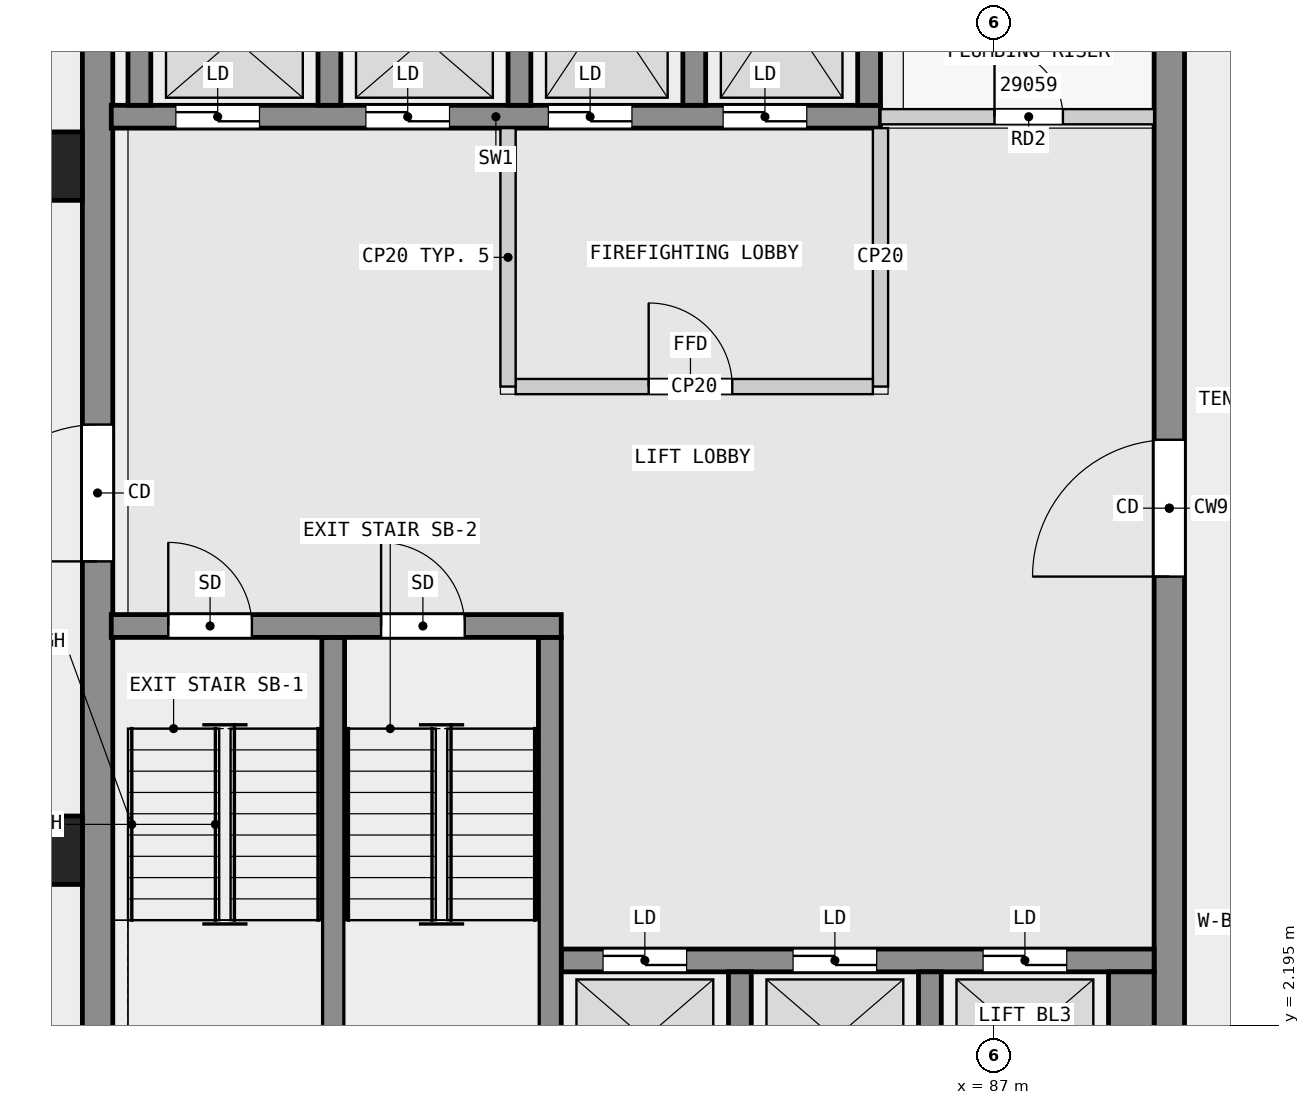
"""IFC4 building model, lengths in metres.
Left out: names, types, materials, properties, quantities, classifications, styles, units other than length and angle.
Written with IfcOpenShell. Run it as: python <this file> out.ifc"""

import sys

from ifc_helpers import new_model, si_unit, direction, frame, frame_2d, origin, origin_2d, place, context, subcontext, project, spatial, rectangle, extrude, element, fill, save


model = new_model("IFC4")
c1 = context("Model", 3, precision=1e-05, world=origin(), true_north=direction((0.0, 1.0)))
c2 = subcontext(c1, "Body", "Model", "MODEL_VIEW")
j1 = project(units=[si_unit("LENGTHUNIT", "METRE"), si_unit("PLANEANGLEUNIT", "RADIAN")], contexts=[c1])
p1 = place(None, origin())
s1 = spatial("IfcSite", under=j1, at=p1, CompositionType="ELEMENT")
p2 = place(p1, origin())
s2 = spatial("IfcBuilding", under=s1, at=p2, CompositionType="ELEMENT")
p3 = place(p2, frame((0.0, 0.0, 113.3)))
s3 = spatial("IfcBuildingStorey", under=s2, at=p3, CompositionType="ELEMENT", Elevation=113.3)
for number, where, z_axis, x_axis in (
    (1, (74.55, 13.5, 0.0), (0.0, 0.0, 1.0), (1.0, 0.0, 0.0)),
    (2, (74.55, 4.5, 0.0), (0.0, 0.0, 1.0), (1.0, 0.0, 0.0)),
):
    element("IfcColumn", number, at=place(p3, frame(where, z_axis=z_axis, x_axis=x_axis)), inside=s3, PredefinedType="COLUMN", context=c2, shape_type="SweptSolid", body=[
        extrude(rectangle(XDim=0.9, YDim=0.9, at=origin_2d()), origin(), (0.0, 0.0, 1.0), 3.5),
    ])
p4 = place(p3, frame((75.2, 0.4, 0.0), z_axis=(0.0, 0.0, 1.0), x_axis=(0.0, 1.0, 0.0)))
e3 = element("IfcWall", 3, at=p4, inside=s3, PredefinedType="SHEAR", context=c2, shape_type="SweptSolid", body=[
    extrude(rectangle(XDim=17.2, YDim=0.4, at=frame_2d((8.6, 0.0))), origin(), (0.0, 0.0, 1.0), 3.25),
])
p5 = place(p4, frame((7.9, 0.0, 0.0)))
e4 = element("IfcOpeningElement", 4, at=p5, cuts=e3, PredefinedType="OPENING", context=c2, shape_type="SweptSolid", body=[
    extrude(rectangle(XDim=1.8, YDim=2.1, at=frame_2d((0.9, 1.05))), frame((0.0, 0.21, 0.0), z_axis=(0.0, -1.0, 0.0), x_axis=(1.0, 0.0, 0.0)), (0.0, 0.0, 1.0), 0.42),
])
p6 = place(p3, frame((89.3, 0.4, 0.0), z_axis=(0.0, 0.0, 1.0), x_axis=(0.0, 1.0, 0.0)))
e5 = element("IfcWall", 5, at=p6, inside=s3, PredefinedType="SHEAR", context=c2, shape_type="SweptSolid", body=[
    extrude(rectangle(XDim=17.2, YDim=0.4, at=frame_2d((8.6, 0.0))), origin(), (0.0, 0.0, 1.0), 3.25),
])
p7 = place(p6, frame((7.7, 0.0, 0.0)))
e6 = element("IfcOpeningElement", 6, at=p7, cuts=e5, PredefinedType="OPENING", context=c2, shape_type="SweptSolid", body=[
    extrude(rectangle(XDim=1.8, YDim=2.1, at=frame_2d((0.9, 1.05))), frame((0.0, 0.21, 0.0), z_axis=(0.0, -1.0, 0.0), x_axis=(1.0, 0.0, 0.0)), (0.0, 0.0, 1.0), 0.42),
])
p8 = place(p6, frame((15.925, 0.0, 0.0)))
e7 = element("IfcOpeningElement", 7, at=p8, cuts=e5, PredefinedType="OPENING", context=c2, shape_type="SweptSolid", body=[
    extrude(rectangle(XDim=0.9, YDim=2.1, at=frame_2d((0.45, 1.05))), frame((0.0, 0.21, 0.0), z_axis=(0.0, -1.0, 0.0), x_axis=(1.0, 0.0, 0.0)), (0.0, 0.0, 1.0), 0.42),
])
p9 = place(p3, frame((75.38, 7.45, 0.0), z_axis=(0.0, 0.0, 1.0), x_axis=(1.0, 0.0, 0.0)))
e8 = element("IfcWall", 8, at=p9, inside=s3, PredefinedType="SHEAR", context=c2, shape_type="SweptSolid", body=[
    extrude(rectangle(XDim=5.92, YDim=0.3, at=frame_2d((2.96, 0.0))), origin(), (0.0, 0.0, 1.0), 3.25),
])
p10 = place(p9, frame((0.75, 0.0, 0.0)))
e9 = element("IfcOpeningElement", 9, at=p10, cuts=e8, PredefinedType="OPENING", context=c2, shape_type="SweptSolid", body=[
    extrude(rectangle(XDim=1.1, YDim=2.1, at=frame_2d((0.55, 1.05))), frame((0.0, 0.16, 0.0), z_axis=(0.0, -1.0, 0.0), x_axis=(1.0, 0.0, 0.0)), (0.0, 0.0, 1.0), 0.32),
])
p11 = place(p9, frame((3.55, 0.0, 0.0)))
e10 = element("IfcOpeningElement", 10, at=p11, cuts=e8, PredefinedType="OPENING", context=c2, shape_type="SweptSolid", body=[
    extrude(rectangle(XDim=1.1, YDim=2.1, at=frame_2d((0.55, 1.05))), frame((0.0, 0.16, 0.0), z_axis=(0.0, -1.0, 0.0), x_axis=(1.0, 0.0, 0.0)), (0.0, 0.0, 1.0), 0.32),
])
for number, where, z_axis, x_axis in (
    (11, (78.3, 0.9, 0.0), (0.0, 0.0, 1.0), (0.0, 1.0, 0.0)),
    (12, (81.15, 0.9, 0.0), (0.0, 0.0, 1.0), (0.0, 1.0, 0.0)),
):
    element("IfcWall", number, at=place(p3, frame(where, z_axis=z_axis, x_axis=x_axis)), inside=s3, PredefinedType="SHEAR", context=c2, shape_type="SweptSolid", body=[
        extrude(rectangle(XDim=6.4, YDim=0.3, at=frame_2d((3.2, 0.0))), origin(), (0.0, 0.0, 1.0), 3.25),
    ])
for number, where, z_axis, x_axis in (
    (13, (83.65, 0.9, 0.0), (0.0, 0.0, 1.0), (0.0, 1.0, 0.0)),
    (14, (86.15, 0.9, 0.0), (0.0, 0.0, 1.0), (0.0, 1.0, 0.0)),
):
    element("IfcWall", number, at=place(p3, frame(where, z_axis=z_axis, x_axis=x_axis)), inside=s3, PredefinedType="SHEAR", context=c2, shape_type="SweptSolid", body=[
        extrude(rectangle(XDim=2.0, YDim=0.3, at=frame_2d((1.0, 0.0))), origin(), (0.0, 0.0, 1.0), 3.25),
    ])
p12 = place(p3, frame((88.8, 0.9, 0.0), z_axis=(0.0, 0.0, 1.0), x_axis=(0.0, 1.0, 0.0)))
e15 = element("IfcWall", 15, at=p12, inside=s3, PredefinedType="SHEAR", context=c2, shape_type="SweptSolid", body=[
    extrude(rectangle(XDim=2.0, YDim=0.6, at=frame_2d((1.0, 0.0))), origin(), (0.0, 0.0, 1.0), 3.25),
])
p13 = place(p3, frame((81.3, 3.05, 0.0), z_axis=(0.0, 0.0, 1.0), x_axis=(1.0, 0.0, 0.0)))
e16 = element("IfcWall", 16, at=p13, inside=s3, PredefinedType="SHEAR", context=c2, shape_type="SweptSolid", body=[
    extrude(rectangle(XDim=7.8, YDim=0.3, at=frame_2d((3.9, 0.0))), origin(), (0.0, 0.0, 1.0), 3.25),
])
p14 = place(p13, frame((0.55, 0.0, 0.0)))
e17 = element("IfcOpeningElement", 17, at=p14, cuts=e16, PredefinedType="OPENING", context=c2, shape_type="SweptSolid", body=[
    extrude(rectangle(XDim=1.1, YDim=2.1, at=frame_2d((0.55, 1.05))), frame((0.0, 0.16, 0.0), z_axis=(0.0, -1.0, 0.0), x_axis=(1.0, 0.0, 0.0)), (0.0, 0.0, 1.0), 0.32),
])
p15 = place(p13, frame((3.05, 0.0, 0.0)))
e18 = element("IfcOpeningElement", 18, at=p15, cuts=e16, PredefinedType="OPENING", context=c2, shape_type="SweptSolid", body=[
    extrude(rectangle(XDim=1.1, YDim=2.1, at=frame_2d((0.55, 1.05))), frame((0.0, 0.16, 0.0), z_axis=(0.0, -1.0, 0.0), x_axis=(1.0, 0.0, 0.0)), (0.0, 0.0, 1.0), 0.32),
])
p16 = place(p13, frame((5.55, 0.0, 0.0)))
e19 = element("IfcOpeningElement", 19, at=p16, cuts=e16, PredefinedType="OPENING", context=c2, shape_type="SweptSolid", body=[
    extrude(rectangle(XDim=1.1, YDim=2.1, at=frame_2d((0.55, 1.05))), frame((0.0, 0.16, 0.0), z_axis=(0.0, -1.0, 0.0), x_axis=(1.0, 0.0, 0.0)), (0.0, 0.0, 1.0), 0.32),
])
p17 = place(p3, frame((75.38, 14.15, 0.0), z_axis=(0.0, 0.0, 1.0), x_axis=(1.0, 0.0, 0.0)))
e20 = element("IfcWall", 20, at=p17, inside=s3, PredefinedType="SHEAR", context=c2, shape_type="SweptSolid", body=[
    extrude(rectangle(XDim=10.12, YDim=0.3, at=frame_2d((5.06, 0.0))), origin(), (0.0, 0.0, 1.0), 3.25),
])
p18 = place(p17, frame((0.85, 0.0, 0.0)))
e21 = element("IfcOpeningElement", 21, at=p18, cuts=e20, PredefinedType="OPENING", context=c2, shape_type="SweptSolid", body=[
    extrude(rectangle(XDim=1.1, YDim=2.1, at=frame_2d((0.55, 1.05))), frame((0.0, 0.16, 0.0), z_axis=(0.0, -1.0, 0.0), x_axis=(1.0, 0.0, 0.0)), (0.0, 0.0, 1.0), 0.32),
])
p19 = place(p17, frame((3.35, 0.0, 0.0)))
e22 = element("IfcOpeningElement", 22, at=p19, cuts=e20, PredefinedType="OPENING", context=c2, shape_type="SweptSolid", body=[
    extrude(rectangle(XDim=1.1, YDim=2.1, at=frame_2d((0.55, 1.05))), frame((0.0, 0.16, 0.0), z_axis=(0.0, -1.0, 0.0), x_axis=(1.0, 0.0, 0.0)), (0.0, 0.0, 1.0), 0.32),
])
p20 = place(p17, frame((5.75, 0.0, 0.0)))
e23 = element("IfcOpeningElement", 23, at=p20, cuts=e20, PredefinedType="OPENING", context=c2, shape_type="SweptSolid", body=[
    extrude(rectangle(XDim=1.1, YDim=2.1, at=frame_2d((0.55, 1.05))), frame((0.0, 0.16, 0.0), z_axis=(0.0, -1.0, 0.0), x_axis=(1.0, 0.0, 0.0)), (0.0, 0.0, 1.0), 0.32),
])
p21 = place(p17, frame((8.05, 0.0, 0.0)))
e24 = element("IfcOpeningElement", 24, at=p21, cuts=e20, PredefinedType="OPENING", context=c2, shape_type="SweptSolid", body=[
    extrude(rectangle(XDim=1.1, YDim=2.1, at=frame_2d((0.55, 1.05))), frame((0.0, 0.16, 0.0), z_axis=(0.0, -1.0, 0.0), x_axis=(1.0, 0.0, 0.0)), (0.0, 0.0, 1.0), 0.32),
])
for number, where, z_axis, x_axis in (
    (25, (75.75, 14.3, 0.0), (0.0, 0.0, 1.0), (0.0, 1.0, 0.0)),
    (26, (78.25, 14.3, 0.0), (0.0, 0.0, 1.0), (0.0, 1.0, 0.0)),
    (27, (80.75, 14.3, 0.0), (0.0, 0.0, 1.0), (0.0, 1.0, 0.0)),
    (28, (83.05, 14.3, 0.0), (0.0, 0.0, 1.0), (0.0, 1.0, 0.0)),
    (29, (85.35, 14.3, 0.0), (0.0, 0.0, 1.0), (0.0, 1.0, 0.0)),
):
    element("IfcWall", number, at=place(p3, frame(where, z_axis=z_axis, x_axis=x_axis)), inside=s3, PredefinedType="SHEAR", context=c2, shape_type="SweptSolid", body=[
        extrude(rectangle(XDim=2.8, YDim=0.3, at=frame_2d((1.4, 0.0))), origin(), (0.0, 0.0, 1.0), 3.25),
    ])
p22 = place(p3, frame((80.6, 10.6, 0.0), z_axis=(0.0, 0.0, 1.0), x_axis=(0.0, 1.0, 0.0)))
e30 = element("IfcWall", 30, at=p22, inside=s3, PredefinedType="PARTITIONING", context=c2, shape_type="SweptSolid", body=[
    extrude(rectangle(XDim=3.4, YDim=0.2, at=frame_2d((1.7, 0.0))), origin(), (0.0, 0.0, 1.0), 3.25),
])
p23 = place(p3, frame((80.7, 10.6, 0.0), z_axis=(0.0, 0.0, 1.0), x_axis=(1.0, 0.0, 0.0)))
e31 = element("IfcWall", 31, at=p23, inside=s3, PredefinedType="PARTITIONING", context=c2, shape_type="SweptSolid", body=[
    extrude(rectangle(XDim=4.7, YDim=0.2, at=frame_2d((2.35, 0.0))), origin(), (0.0, 0.0, 1.0), 3.25),
])
p24 = place(p23, frame((1.75, 0.0, 0.0)))
e32 = element("IfcOpeningElement", 32, at=p24, cuts=e31, PredefinedType="OPENING", context=c2, shape_type="SweptSolid", body=[
    extrude(rectangle(XDim=1.1, YDim=2.1, at=frame_2d((0.55, 1.05))), frame((0.0, 0.11, 0.0), z_axis=(0.0, -1.0, 0.0), x_axis=(1.0, 0.0, 0.0)), (0.0, 0.0, 1.0), 0.22),
])
p25 = place(p3, frame((85.5, 10.6, 0.0), z_axis=(0.0, 0.0, 1.0), x_axis=(0.0, 1.0, 0.0)))
e33 = element("IfcWall", 33, at=p25, inside=s3, PredefinedType="PARTITIONING", context=c2, shape_type="SweptSolid", body=[
    extrude(rectangle(XDim=3.4, YDim=0.2, at=frame_2d((1.7, 0.0))), origin(), (0.0, 0.0, 1.0), 3.25),
])
p26 = place(p3, frame((85.5, 14.15, 0.0), z_axis=(0.0, 0.0, 1.0), x_axis=(1.0, 0.0, 0.0)))
e34 = element("IfcWall", 34, at=p26, inside=s3, PredefinedType="PARTITIONING", context=c2, shape_type="SweptSolid", body=[
    extrude(rectangle(XDim=3.6, YDim=0.2, at=frame_2d((1.8, 0.0))), origin(), (0.0, 0.0, 1.0), 3.25),
])
p27 = place(p26, frame((1.5, 0.0, 0.0)))
e35 = element("IfcOpeningElement", 35, at=p27, cuts=e34, PredefinedType="OPENING", context=c2, shape_type="SweptSolid", body=[
    extrude(rectangle(XDim=0.9, YDim=2.1, at=frame_2d((0.45, 1.05))), frame((0.0, 0.11, 0.0), z_axis=(0.0, -1.0, 0.0), x_axis=(1.0, 0.0, 0.0)), (0.0, 0.0, 1.0), 0.22),
])
p28 = place(p24, origin())
e36 = element("IfcDoor", 36, at=p28, inside=s3, OperationType="SINGLE_SWING_LEFT", PredefinedType="DOOR", context=c2, shape_type="SweptSolid", body=[
    extrude(rectangle(XDim=1.1, YDim=2.1, at=frame_2d((0.55, 1.05))), frame((0.0, 0.025, 0.0), z_axis=(0.0, -1.0, 0.0), x_axis=(1.0, 0.0, 0.0)), (0.0, 0.0, 1.0), 0.05),
])
fill(e32, e36)
p29 = place(p14, origin())
e37 = element("IfcDoor", 37, at=p29, inside=s3, OperationType="DOUBLE_DOOR_SLIDING", PredefinedType="DOOR", context=c2, shape_type="SweptSolid", body=[
    extrude(rectangle(XDim=1.1, YDim=2.1, at=frame_2d((0.55, 1.05))), frame((0.0, 0.025, 0.0), z_axis=(0.0, -1.0, 0.0), x_axis=(1.0, 0.0, 0.0)), (0.0, 0.0, 1.0), 0.05),
])
fill(e17, e37)
p30 = place(p15, origin())
e38 = element("IfcDoor", 38, at=p30, inside=s3, OperationType="DOUBLE_DOOR_SLIDING", PredefinedType="DOOR", context=c2, shape_type="SweptSolid", body=[
    extrude(rectangle(XDim=1.1, YDim=2.1, at=frame_2d((0.55, 1.05))), frame((0.0, 0.025, 0.0), z_axis=(0.0, -1.0, 0.0), x_axis=(1.0, 0.0, 0.0)), (0.0, 0.0, 1.0), 0.05),
])
fill(e18, e38)
p31 = place(p16, origin())
e39 = element("IfcDoor", 39, at=p31, inside=s3, OperationType="DOUBLE_DOOR_SLIDING", PredefinedType="DOOR", context=c2, shape_type="SweptSolid", body=[
    extrude(rectangle(XDim=1.1, YDim=2.1, at=frame_2d((0.55, 1.05))), frame((0.0, 0.025, 0.0), z_axis=(0.0, -1.0, 0.0), x_axis=(1.0, 0.0, 0.0)), (0.0, 0.0, 1.0), 0.05),
])
fill(e19, e39)
p32 = place(p18, origin())
e40 = element("IfcDoor", 40, at=p32, inside=s3, OperationType="DOUBLE_DOOR_SLIDING", PredefinedType="DOOR", context=c2, shape_type="SweptSolid", body=[
    extrude(rectangle(XDim=1.1, YDim=2.1, at=frame_2d((0.55, 1.05))), frame((0.0, 0.025, 0.0), z_axis=(0.0, -1.0, 0.0), x_axis=(1.0, 0.0, 0.0)), (0.0, 0.0, 1.0), 0.05),
])
fill(e21, e40)
p33 = place(p19, origin())
e41 = element("IfcDoor", 41, at=p33, inside=s3, OperationType="DOUBLE_DOOR_SLIDING", PredefinedType="DOOR", context=c2, shape_type="SweptSolid", body=[
    extrude(rectangle(XDim=1.1, YDim=2.1, at=frame_2d((0.55, 1.05))), frame((0.0, 0.025, 0.0), z_axis=(0.0, -1.0, 0.0), x_axis=(1.0, 0.0, 0.0)), (0.0, 0.0, 1.0), 0.05),
])
fill(e22, e41)
p34 = place(p20, origin())
e42 = element("IfcDoor", 42, at=p34, inside=s3, OperationType="DOUBLE_DOOR_SLIDING", PredefinedType="DOOR", context=c2, shape_type="SweptSolid", body=[
    extrude(rectangle(XDim=1.1, YDim=2.1, at=frame_2d((0.55, 1.05))), frame((0.0, 0.025, 0.0), z_axis=(0.0, -1.0, 0.0), x_axis=(1.0, 0.0, 0.0)), (0.0, 0.0, 1.0), 0.05),
])
fill(e23, e42)
p35 = place(p21, origin())
e43 = element("IfcDoor", 43, at=p35, inside=s3, OperationType="DOUBLE_DOOR_SLIDING", PredefinedType="DOOR", context=c2, shape_type="SweptSolid", body=[
    extrude(rectangle(XDim=1.1, YDim=2.1, at=frame_2d((0.55, 1.05))), frame((0.0, 0.025, 0.0), z_axis=(0.0, -1.0, 0.0), x_axis=(1.0, 0.0, 0.0)), (0.0, 0.0, 1.0), 0.05),
])
fill(e24, e43)
p36 = place(p10, origin())
e44 = element("IfcDoor", 44, at=p36, inside=s3, OperationType="SINGLE_SWING_RIGHT", PredefinedType="DOOR", context=c2, shape_type="SweptSolid", body=[
    extrude(rectangle(XDim=1.1, YDim=2.1, at=frame_2d((0.55, 1.05))), frame((0.0, 0.025, 0.0), z_axis=(0.0, -1.0, 0.0), x_axis=(1.0, 0.0, 0.0)), (0.0, 0.0, 1.0), 0.05),
])
fill(e9, e44)
p37 = place(p11, origin())
e45 = element("IfcDoor", 45, at=p37, inside=s3, OperationType="SINGLE_SWING_LEFT", PredefinedType="DOOR", context=c2, shape_type="SweptSolid", body=[
    extrude(rectangle(XDim=1.1, YDim=2.1, at=frame_2d((0.55, 1.05))), frame((0.0, 0.025, 0.0), z_axis=(0.0, -1.0, 0.0), x_axis=(1.0, 0.0, 0.0)), (0.0, 0.0, 1.0), 0.05),
])
fill(e10, e45)
p38 = place(p5, origin())
e46 = element("IfcDoor", 46, at=p38, inside=s3, OperationType="DOUBLE_DOOR_SINGLE_SWING", PredefinedType="DOOR", context=c2, shape_type="SweptSolid", body=[
    extrude(rectangle(XDim=1.8, YDim=2.1, at=frame_2d((0.9, 1.05))), frame((0.0, 0.025, 0.0), z_axis=(0.0, -1.0, 0.0), x_axis=(1.0, 0.0, 0.0)), (0.0, 0.0, 1.0), 0.05),
])
fill(e4, e46)
p39 = place(p7, origin())
e47 = element("IfcDoor", 47, at=p39, inside=s3, OperationType="DOUBLE_DOOR_SINGLE_SWING", PredefinedType="DOOR", context=c2, shape_type="SweptSolid", body=[
    extrude(rectangle(XDim=1.8, YDim=2.1, at=frame_2d((0.9, 1.05))), frame((0.0, 0.025, 0.0), z_axis=(0.0, -1.0, 0.0), x_axis=(1.0, 0.0, 0.0)), (0.0, 0.0, 1.0), 0.05),
])
fill(e6, e47)
p40 = place(p27, origin())
e48 = element("IfcDoor", 48, at=p40, inside=s3, OperationType="SINGLE_SWING_LEFT", PredefinedType="DOOR", context=c2, shape_type="SweptSolid", body=[
    extrude(rectangle(XDim=0.9, YDim=2.1, at=frame_2d((0.45, 1.05))), frame((0.0, 0.025, 0.0), z_axis=(0.0, -1.0, 0.0), x_axis=(1.0, 0.0, 0.0)), (0.0, 0.0, 1.0), 0.05),
])
fill(e35, e48)
save(model, sys.argv[1])
